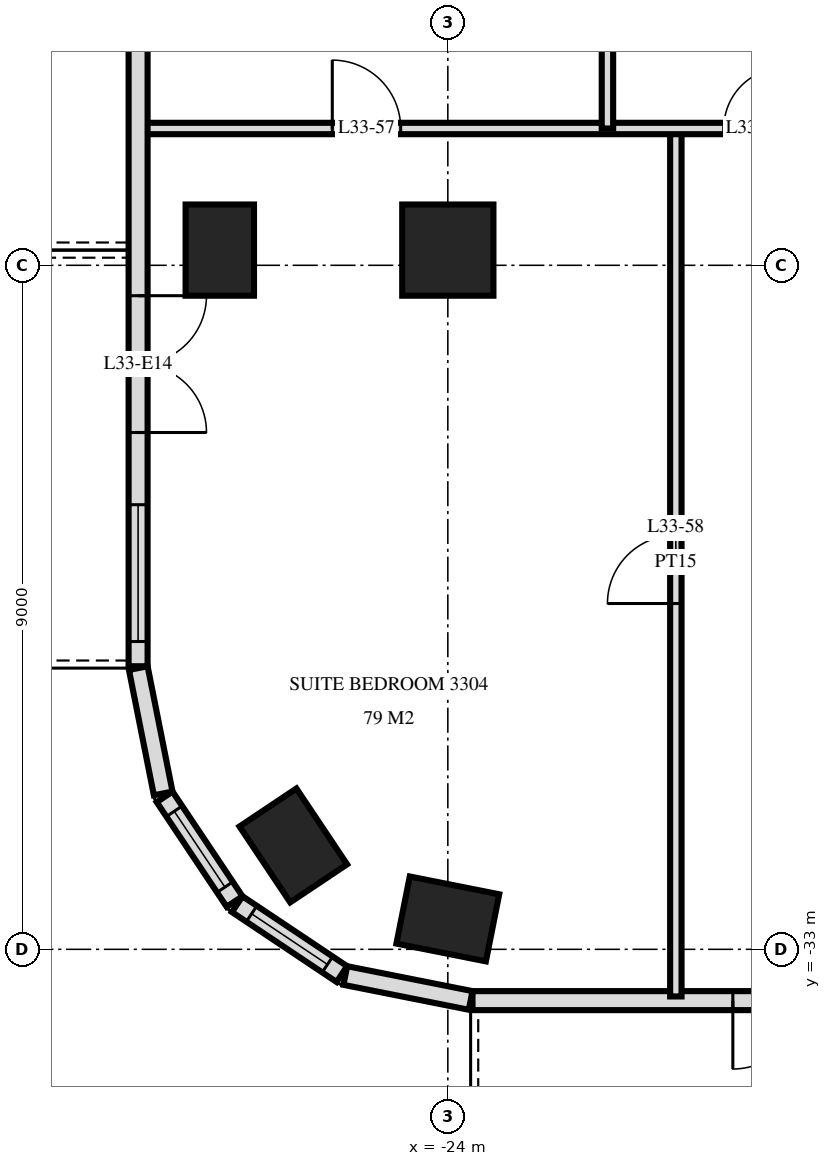
"""IFC4 building model, lengths in metres.
Left out: names, types, materials, properties, quantities, classifications, styles, units other than length and angle.
Written with IfcOpenShell. Run it as: python <this file> out.ifc"""

import sys

from ifc_helpers import new_model, si_unit, direction, frame, frame_2d, origin, origin_2d, place, context, subcontext, project, spatial, rectangle, extrude, element, fill, save


model = new_model("IFC4")
c1 = context("Model", 3, precision=1e-05, world=origin(), true_north=direction((0.0, 1.0)))
c2 = subcontext(c1, "Body", "Model", "MODEL_VIEW")
j1 = project(units=[si_unit("LENGTHUNIT", "METRE"), si_unit("PLANEANGLEUNIT", "RADIAN")], contexts=[c1])
p1 = place(None, origin())
s1 = spatial("IfcSite", under=j1, at=p1, CompositionType="ELEMENT")
p2 = place(p1, origin())
s2 = spatial("IfcBuilding", under=s1, at=p2, CompositionType="ELEMENT")
p3 = place(p2, frame((0.0, 0.0, 130.8)))
s3 = spatial("IfcBuildingStorey", under=s2, at=p3, CompositionType="ELEMENT", Elevation=130.8)
for number, where, z_axis, x_axis in (
    (1, (-27.0, -23.8, 0.0), (0.0, 0.0, 1.0), (0.0, 1.0, 0.0)),
    (2, (-26.033, -31.633, 0.0), (0.0, 0.0, 1.0), (-0.556, 0.831, 0.0)),
    (3, (-24.0, -32.6, 0.0), (0.0, 0.0, 1.0), (-0.981, 0.195, 0.0)),
):
    element("IfcColumn", number, at=place(p3, frame(where, z_axis=z_axis, x_axis=x_axis)), inside=s3, PredefinedType="COLUMN", context=c2, shape_type="SweptSolid", body=[
        extrude(rectangle(XDim=1.2, YDim=0.9, at=origin_2d()), origin(), (0.0, 0.0, 1.0), 3.6),
    ])
p4 = place(p3, frame((-24.0, -23.8, 0.0), z_axis=(0.0, 0.0, 1.0), x_axis=(1.0, 0.0, 0.0)))
e4 = element("IfcColumn", 4, at=p4, inside=s3, PredefinedType="COLUMN", context=c2, shape_type="SweptSolid", body=[
    extrude(rectangle(XDim=1.2, YDim=1.2, at=origin_2d()), origin(), (0.0, 0.0, 1.0), 3.6),
])
p5 = place(p3, frame((-28.075, -3.325, 0.0), z_axis=(0.0, 0.0, 1.0), x_axis=(0.0, -1.0, 0.0)))
e5 = element("IfcWall", 5, at=p5, inside=s3, PredefinedType="SOLIDWALL", context=c2, shape_type="SweptSolid", body=[
    extrude(rectangle(XDim=25.951, YDim=0.25, at=frame_2d((12.975, 0.0))), origin(), (0.0, 0.0, 1.0), 3.32),
])
p6 = place(p5, frame((6.575, 0.0, 0.0)))
e6 = element("IfcOpeningElement", 6, at=p6, cuts=e5, PredefinedType="OPENING", context=c2, shape_type="SweptSolid", body=[
    extrude(rectangle(XDim=1.8, YDim=2.4, at=frame_2d((0.9, 1.2))), frame((0.0, 0.135, 0.0), z_axis=(0.0, -1.0, 0.0), x_axis=(1.0, 0.0, 0.0)), (0.0, 0.0, 1.0), 0.27),
])
p7 = place(p5, frame((9.425, 0.0, 0.3)))
e7 = element("IfcOpeningElement", 7, at=p7, cuts=e5, PredefinedType="OPENING", context=c2, shape_type="SweptSolid", body=[
    extrude(rectangle(XDim=1.8, YDim=2.1, at=frame_2d((0.9, 1.05))), frame((0.0, 0.135, 0.0), z_axis=(0.0, -1.0, 0.0), x_axis=(1.0, 0.0, 0.0)), (0.0, 0.0, 1.0), 0.27),
])
p8 = place(p5, frame((12.575, 0.0, 0.3)))
e8 = element("IfcOpeningElement", 8, at=p8, cuts=e5, PredefinedType="OPENING", context=c2, shape_type="SweptSolid", body=[
    extrude(rectangle(XDim=1.2, YDim=2.1, at=frame_2d((0.6, 1.05))), frame((0.0, 0.135, 0.0), z_axis=(0.0, -1.0, 0.0), x_axis=(1.0, 0.0, 0.0)), (0.0, 0.0, 1.0), 0.27),
])
p9 = place(p5, frame((15.875, 0.0, 0.0)))
e9 = element("IfcOpeningElement", 9, at=p9, cuts=e5, PredefinedType="OPENING", context=c2, shape_type="SweptSolid", body=[
    extrude(rectangle(XDim=1.8, YDim=2.4, at=frame_2d((0.9, 1.2))), frame((0.0, 0.135, 0.0), z_axis=(0.0, -1.0, 0.0), x_axis=(1.0, 0.0, 0.0)), (0.0, 0.0, 1.0), 0.27),
])
p10 = place(p5, frame((21.075, 0.0, 0.0)))
e10 = element("IfcOpeningElement", 10, at=p10, cuts=e5, PredefinedType="OPENING", context=c2, shape_type="SweptSolid", body=[
    extrude(rectangle(XDim=1.8, YDim=2.4, at=frame_2d((0.9, 1.2))), frame((0.0, 0.135, 0.0), z_axis=(0.0, -1.0, 0.0), x_axis=(1.0, 0.0, 0.0)), (0.0, 0.0, 1.0), 0.27),
])
p11 = place(p5, frame((23.825, 0.0, 0.3)))
e11 = element("IfcOpeningElement", 11, at=p11, cuts=e5, PredefinedType="OPENING", context=c2, shape_type="SweptSolid", body=[
    extrude(rectangle(XDim=1.8, YDim=2.1, at=frame_2d((0.9, 1.05))), frame((0.0, 0.135, 0.0), z_axis=(0.0, -1.0, 0.0), x_axis=(1.0, 0.0, 0.0)), (0.0, 0.0, 1.0), 0.27),
])
p12 = place(p3, frame((-28.073, -29.3, 0.0), z_axis=(0.0, 0.0, 1.0), x_axis=(0.194999110559, -0.980803419081, 0.0)))
e12 = element("IfcWall", 12, at=p12, inside=s3, PredefinedType="SOLIDWALL", context=c2, shape_type="SweptSolid", body=[
    extrude(rectangle(XDim=1.681, YDim=0.25, at=frame_2d((0.841, 0.0))), origin(), (0.0, 0.0, 1.0), 3.32),
])
p13 = place(p3, frame((-27.726, -30.994, 0.0), z_axis=(0.0, 0.0, 1.0), x_axis=(0.55555029066, -0.831482937015, 0.0)))
e13 = element("IfcWall", 13, at=p13, inside=s3, PredefinedType="SOLIDWALL", context=c2, shape_type="SweptSolid", body=[
    extrude(rectangle(XDim=1.656, YDim=0.25, at=frame_2d((0.828, 0.0))), origin(), (0.0, 0.0, 1.0), 3.32),
])
p14 = place(p13, frame((0.228, 0.0, 0.9)))
e14 = element("IfcOpeningElement", 14, at=p14, cuts=e13, PredefinedType="OPENING", context=c2, shape_type="SweptSolid", body=[
    extrude(rectangle(XDim=1.2, YDim=1.5, at=frame_2d((0.6, 0.75))), frame((0.0, 0.135, 0.0), z_axis=(0.0, -1.0, 0.0), x_axis=(1.0, 0.0, 0.0)), (0.0, 0.0, 1.0), 0.27),
])
p15 = place(p3, frame((-26.771, -32.406, 0.0), z_axis=(0.0, 0.0, 1.0), x_axis=(0.831482937015, -0.55555029066, 0.0)))
e15 = element("IfcWall", 15, at=p15, inside=s3, PredefinedType="SOLIDWALL", context=c2, shape_type="SweptSolid", body=[
    extrude(rectangle(XDim=1.656, YDim=0.25, at=frame_2d((0.828, 0.0))), origin(), (0.0, 0.0, 1.0), 3.32),
])
p16 = place(p15, frame((0.228, 0.0, 0.9)))
e16 = element("IfcOpeningElement", 16, at=p16, cuts=e15, PredefinedType="OPENING", context=c2, shape_type="SweptSolid", body=[
    extrude(rectangle(XDim=1.2, YDim=1.5, at=frame_2d((0.6, 0.75))), frame((0.0, 0.135, 0.0), z_axis=(0.0, -1.0, 0.0), x_axis=(1.0, 0.0, 0.0)), (0.0, 0.0, 1.0), 0.27),
])
p17 = place(p3, frame((-25.349, -33.344, 0.0), z_axis=(0.0, 0.0, 1.0), x_axis=(0.980775640221, -0.19513878023, 0.0)))
e17 = element("IfcWall", 17, at=p17, inside=s3, PredefinedType="SOLIDWALL", context=c2, shape_type="SweptSolid", body=[
    extrude(rectangle(XDim=1.681, YDim=0.25, at=frame_2d((0.841, 0.0))), origin(), (0.0, 0.0, 1.0), 3.32),
])
p18 = place(p3, frame((-23.675, -33.675, 0.0), z_axis=(0.0, 0.0, 1.0), x_axis=(1.0, 0.0, 0.0)))
e18 = element("IfcWall", 18, at=p18, inside=s3, PredefinedType="SOLIDWALL", context=c2, shape_type="SweptSolid", body=[
    extrude(rectangle(XDim=47.351, YDim=0.25, at=frame_2d((23.675, 0.0))), origin(), (0.0, 0.0, 1.0), 3.32),
])
p19 = place(p18, frame((3.425, 0.0, 0.0)))
e19 = element("IfcOpeningElement", 19, at=p19, cuts=e18, PredefinedType="OPENING", context=c2, shape_type="SweptSolid", body=[
    extrude(rectangle(XDim=1.8, YDim=2.4, at=frame_2d((0.9, 1.2))), frame((0.0, 0.135, 0.0), z_axis=(0.0, -1.0, 0.0), x_axis=(1.0, 0.0, 0.0)), (0.0, 0.0, 1.0), 0.27),
])
p20 = place(p18, frame((6.275, 0.0, 0.0)))
e20 = element("IfcOpeningElement", 20, at=p20, cuts=e18, PredefinedType="OPENING", context=c2, shape_type="SweptSolid", body=[
    extrude(rectangle(XDim=1.8, YDim=2.4, at=frame_2d((0.9, 1.2))), frame((0.0, 0.135, 0.0), z_axis=(0.0, -1.0, 0.0), x_axis=(1.0, 0.0, 0.0)), (0.0, 0.0, 1.0), 0.27),
])
p21 = place(p18, frame((8.975, 0.0, 0.3)))
e21 = element("IfcOpeningElement", 21, at=p21, cuts=e18, PredefinedType="OPENING", context=c2, shape_type="SweptSolid", body=[
    extrude(rectangle(XDim=2.4, YDim=2.1, at=frame_2d((1.2, 1.05))), frame((0.0, 0.135, 0.0), z_axis=(0.0, -1.0, 0.0), x_axis=(1.0, 0.0, 0.0)), (0.0, 0.0, 1.0), 0.27),
])
p22 = place(p18, frame((12.275, 0.0, 0.0)))
e22 = element("IfcOpeningElement", 22, at=p22, cuts=e18, PredefinedType="OPENING", context=c2, shape_type="SweptSolid", body=[
    extrude(rectangle(XDim=1.8, YDim=2.4, at=frame_2d((0.9, 1.2))), frame((0.0, 0.135, 0.0), z_axis=(0.0, -1.0, 0.0), x_axis=(1.0, 0.0, 0.0)), (0.0, 0.0, 1.0), 0.27),
])
p23 = place(p18, frame((14.975, 0.0, 0.3)))
e23 = element("IfcOpeningElement", 23, at=p23, cuts=e18, PredefinedType="OPENING", context=c2, shape_type="SweptSolid", body=[
    extrude(rectangle(XDim=2.4, YDim=2.1, at=frame_2d((1.2, 1.05))), frame((0.0, 0.135, 0.0), z_axis=(0.0, -1.0, 0.0), x_axis=(1.0, 0.0, 0.0)), (0.0, 0.0, 1.0), 0.27),
])
p24 = place(p18, frame((17.975, 0.0, 0.3)))
e24 = element("IfcOpeningElement", 24, at=p24, cuts=e18, PredefinedType="OPENING", context=c2, shape_type="SweptSolid", body=[
    extrude(rectangle(XDim=2.4, YDim=2.1, at=frame_2d((1.2, 1.05))), frame((0.0, 0.135, 0.0), z_axis=(0.0, -1.0, 0.0), x_axis=(1.0, 0.0, 0.0)), (0.0, 0.0, 1.0), 0.27),
])
p25 = place(p18, frame((21.275, 0.0, 0.0)))
e25 = element("IfcOpeningElement", 25, at=p25, cuts=e18, PredefinedType="OPENING", context=c2, shape_type="SweptSolid", body=[
    extrude(rectangle(XDim=1.8, YDim=2.4, at=frame_2d((0.9, 1.2))), frame((0.0, 0.135, 0.0), z_axis=(0.0, -1.0, 0.0), x_axis=(1.0, 0.0, 0.0)), (0.0, 0.0, 1.0), 0.27),
])
p26 = place(p18, frame((24.275, 0.0, 0.0)))
e26 = element("IfcOpeningElement", 26, at=p26, cuts=e18, PredefinedType="OPENING", context=c2, shape_type="SweptSolid", body=[
    extrude(rectangle(XDim=1.8, YDim=2.4, at=frame_2d((0.9, 1.2))), frame((0.0, 0.135, 0.0), z_axis=(0.0, -1.0, 0.0), x_axis=(1.0, 0.0, 0.0)), (0.0, 0.0, 1.0), 0.27),
])
p27 = place(p18, frame((26.975, 0.0, 0.3)))
e27 = element("IfcOpeningElement", 27, at=p27, cuts=e18, PredefinedType="OPENING", context=c2, shape_type="SweptSolid", body=[
    extrude(rectangle(XDim=2.4, YDim=2.1, at=frame_2d((1.2, 1.05))), frame((0.0, 0.135, 0.0), z_axis=(0.0, -1.0, 0.0), x_axis=(1.0, 0.0, 0.0)), (0.0, 0.0, 1.0), 0.27),
])
p28 = place(p18, frame((30.275, 0.0, 0.0)))
e28 = element("IfcOpeningElement", 28, at=p28, cuts=e18, PredefinedType="OPENING", context=c2, shape_type="SweptSolid", body=[
    extrude(rectangle(XDim=1.8, YDim=2.4, at=frame_2d((0.9, 1.2))), frame((0.0, 0.135, 0.0), z_axis=(0.0, -1.0, 0.0), x_axis=(1.0, 0.0, 0.0)), (0.0, 0.0, 1.0), 0.27),
])
p29 = place(p18, frame((32.975, 0.0, 0.3)))
e29 = element("IfcOpeningElement", 29, at=p29, cuts=e18, PredefinedType="OPENING", context=c2, shape_type="SweptSolid", body=[
    extrude(rectangle(XDim=2.4, YDim=2.1, at=frame_2d((1.2, 1.05))), frame((0.0, 0.135, 0.0), z_axis=(0.0, -1.0, 0.0), x_axis=(1.0, 0.0, 0.0)), (0.0, 0.0, 1.0), 0.27),
])
p30 = place(p18, frame((36.275, 0.0, 0.0)))
e30 = element("IfcOpeningElement", 30, at=p30, cuts=e18, PredefinedType="OPENING", context=c2, shape_type="SweptSolid", body=[
    extrude(rectangle(XDim=1.8, YDim=2.4, at=frame_2d((0.9, 1.2))), frame((0.0, 0.135, 0.0), z_axis=(0.0, -1.0, 0.0), x_axis=(1.0, 0.0, 0.0)), (0.0, 0.0, 1.0), 0.27),
])
p31 = place(p18, frame((38.975, 0.0, 0.3)))
e31 = element("IfcOpeningElement", 31, at=p31, cuts=e18, PredefinedType="OPENING", context=c2, shape_type="SweptSolid", body=[
    extrude(rectangle(XDim=2.4, YDim=2.1, at=frame_2d((1.2, 1.05))), frame((0.0, 0.135, 0.0), z_axis=(0.0, -1.0, 0.0), x_axis=(1.0, 0.0, 0.0)), (0.0, 0.0, 1.0), 0.27),
])
p32 = place(p18, frame((41.975, 0.0, 0.3)))
e32 = element("IfcOpeningElement", 32, at=p32, cuts=e18, PredefinedType="OPENING", context=c2, shape_type="SweptSolid", body=[
    extrude(rectangle(XDim=2.4, YDim=2.1, at=frame_2d((1.2, 1.05))), frame((0.0, 0.135, 0.0), z_axis=(0.0, -1.0, 0.0), x_axis=(1.0, 0.0, 0.0)), (0.0, 0.0, 1.0), 0.27),
])
p33 = place(p18, frame((45.125, 0.0, 0.0)))
e33 = element("IfcOpeningElement", 33, at=p33, cuts=e18, PredefinedType="OPENING", context=c2, shape_type="SweptSolid", body=[
    extrude(rectangle(XDim=1.8, YDim=2.4, at=frame_2d((0.9, 1.2))), frame((0.0, 0.135, 0.0), z_axis=(0.0, -1.0, 0.0), x_axis=(1.0, 0.0, 0.0)), (0.0, 0.0, 1.0), 0.27),
])
p34 = place(p3, frame((-21.0, -33.62, 0.0), z_axis=(0.0, 0.0, 1.0), x_axis=(0.0, 1.0, 0.0)))
e34 = element("IfcWall", 34, at=p34, inside=s3, PredefinedType="PARTITIONING", context=c2, shape_type="SweptSolid", body=[
    extrude(rectangle(XDim=11.42, YDim=0.15, at=frame_2d((5.71, 0.0))), origin(), (0.0, 0.0, 1.0), 3.32),
])
p35 = place(p34, frame((5.17, 0.0, 0.0)))
e35 = element("IfcOpeningElement", 35, at=p35, cuts=e34, PredefinedType="OPENING", context=c2, shape_type="SweptSolid", body=[
    extrude(rectangle(XDim=0.9, YDim=2.1, at=frame_2d((0.45, 1.05))), frame((0.0, 0.085, 0.0), z_axis=(0.0, -1.0, 0.0), x_axis=(1.0, 0.0, 0.0)), (0.0, 0.0, 1.0), 0.17),
])
p36 = place(p3, frame((-21.9, -22.2, 0.0), z_axis=(0.0, 0.0, 1.0), x_axis=(0.0, 1.0, 0.0)))
e36 = element("IfcWall", 36, at=p36, inside=s3, PredefinedType="PARTITIONING", context=c2, shape_type="SweptSolid", body=[
    extrude(rectangle(XDim=4.2, YDim=0.15, at=frame_2d((2.1, 0.0))), origin(), (0.0, 0.0, 1.0), 3.32),
])
p37 = place(p3, frame((-28.02, -22.2, 0.0), z_axis=(0.0, 0.0, 1.0), x_axis=(1.0, 0.0, 0.0)))
e37 = element("IfcWall", 37, at=p37, inside=s3, PredefinedType="PARTITIONING", context=c2, shape_type="SweptSolid", body=[
    extrude(rectangle(XDim=9.12, YDim=0.15, at=frame_2d((4.56, 0.0))), origin(), (0.0, 0.0, 1.0), 3.32),
])
p38 = place(p37, frame((7.65, 0.0, 0.0)))
e38 = element("IfcOpeningElement", 38, at=p38, cuts=e37, PredefinedType="OPENING", context=c2, shape_type="SweptSolid", body=[
    extrude(rectangle(XDim=0.8, YDim=2.1, at=frame_2d((0.4, 1.05))), frame((0.0, 0.085, 0.0), z_axis=(0.0, -1.0, 0.0), x_axis=(1.0, 0.0, 0.0)), (0.0, 0.0, 1.0), 0.17),
])
p39 = place(p37, frame((2.5, 0.0, 0.0)))
e39 = element("IfcOpeningElement", 39, at=p39, cuts=e37, PredefinedType="OPENING", context=c2, shape_type="SweptSolid", body=[
    extrude(rectangle(XDim=0.9, YDim=2.1, at=frame_2d((0.45, 1.05))), frame((0.0, 0.085, 0.0), z_axis=(0.0, -1.0, 0.0), x_axis=(1.0, 0.0, 0.0)), (0.0, 0.0, 1.0), 0.17),
])
p40 = place(p14, origin())
e40 = element("IfcWindow", 40, at=p40, inside=s3, PartitioningType="SINGLE_PANEL", PredefinedType="WINDOW", context=c2, shape_type="SweptSolid", body=[
    extrude(rectangle(XDim=1.2, YDim=1.5, at=frame_2d((0.6, 0.75))), frame((0.0, 0.03, 0.0), z_axis=(0.0, -1.0, 0.0), x_axis=(1.0, 0.0, 0.0)), (0.0, 0.0, 1.0), 0.06),
])
fill(e14, e40)
p41 = place(p16, origin())
e41 = element("IfcWindow", 41, at=p41, inside=s3, PartitioningType="SINGLE_PANEL", PredefinedType="WINDOW", context=c2, shape_type="SweptSolid", body=[
    extrude(rectangle(XDim=1.2, YDim=1.5, at=frame_2d((0.6, 0.75))), frame((0.0, 0.03, 0.0), z_axis=(0.0, -1.0, 0.0), x_axis=(1.0, 0.0, 0.0)), (0.0, 0.0, 1.0), 0.06),
])
fill(e16, e41)
p42 = place(p19, frame((0.9, 0.0, 0.0), z_axis=(0.0, 0.0, 1.0), x_axis=(-1.0, 0.0, 0.0)))
e42 = element("IfcDoor", 42, at=p42, inside=s3, OperationType="DOUBLE_DOOR_SINGLE_SWING", PredefinedType="DOOR", context=c2, shape_type="SweptSolid", body=[
    extrude(rectangle(XDim=1.8, YDim=2.4, at=frame_2d((0.0, 1.2))), frame((0.0, -0.025, 0.0), z_axis=(0.0, 1.0, 0.0), x_axis=(-1.0, 0.0, 0.0)), (0.0, 0.0, 1.0), 0.05),
])
fill(e19, e42)
p43 = place(p10, origin())
e43 = element("IfcDoor", 43, at=p43, inside=s3, OperationType="DOUBLE_DOOR_SINGLE_SWING", PredefinedType="DOOR", context=c2, shape_type="SweptSolid", body=[
    extrude(rectangle(XDim=1.8, YDim=2.4, at=frame_2d((0.9, 1.2))), frame((0.0, 0.025, 0.0), z_axis=(0.0, -1.0, 0.0), x_axis=(1.0, 0.0, 0.0)), (0.0, 0.0, 1.0), 0.05),
])
fill(e10, e43)
p44 = place(p11, origin())
e44 = element("IfcWindow", 44, at=p44, inside=s3, PartitioningType="SINGLE_PANEL", PredefinedType="WINDOW", context=c2, shape_type="SweptSolid", body=[
    extrude(rectangle(XDim=1.8, YDim=2.1, at=frame_2d((0.9, 1.05))), frame((0.0, 0.03, 0.0), z_axis=(0.0, -1.0, 0.0), x_axis=(1.0, 0.0, 0.0)), (0.0, 0.0, 1.0), 0.06),
])
fill(e11, e44)
p45 = place(p38, origin())
e45 = element("IfcDoor", 45, at=p45, inside=s3, OperationType="SINGLE_SWING_LEFT", PredefinedType="DOOR", context=c2, shape_type="SweptSolid", body=[
    extrude(rectangle(XDim=0.8, YDim=2.1, at=frame_2d((0.4, 1.05))), frame((0.0, 0.025, 0.0), z_axis=(0.0, -1.0, 0.0), x_axis=(1.0, 0.0, 0.0)), (0.0, 0.0, 1.0), 0.05),
])
fill(e38, e45)
p46 = place(p39, origin())
e46 = element("IfcDoor", 46, at=p46, inside=s3, OperationType="SINGLE_SWING_RIGHT", PredefinedType="DOOR", context=c2, shape_type="SweptSolid", body=[
    extrude(rectangle(XDim=0.9, YDim=2.1, at=frame_2d((0.45, 1.05))), frame((0.0, 0.025, 0.0), z_axis=(0.0, -1.0, 0.0), x_axis=(1.0, 0.0, 0.0)), (0.0, 0.0, 1.0), 0.05),
])
fill(e39, e46)
p47 = place(p35, origin())
e47 = element("IfcDoor", 47, at=p47, inside=s3, OperationType="SINGLE_SWING_RIGHT", PredefinedType="DOOR", context=c2, shape_type="SweptSolid", body=[
    extrude(rectangle(XDim=0.9, YDim=2.1, at=frame_2d((0.45, 1.05))), frame((0.0, 0.025, 0.0), z_axis=(0.0, -1.0, 0.0), x_axis=(1.0, 0.0, 0.0)), (0.0, 0.0, 1.0), 0.05),
])
fill(e35, e47)
save(model, sys.argv[1])
